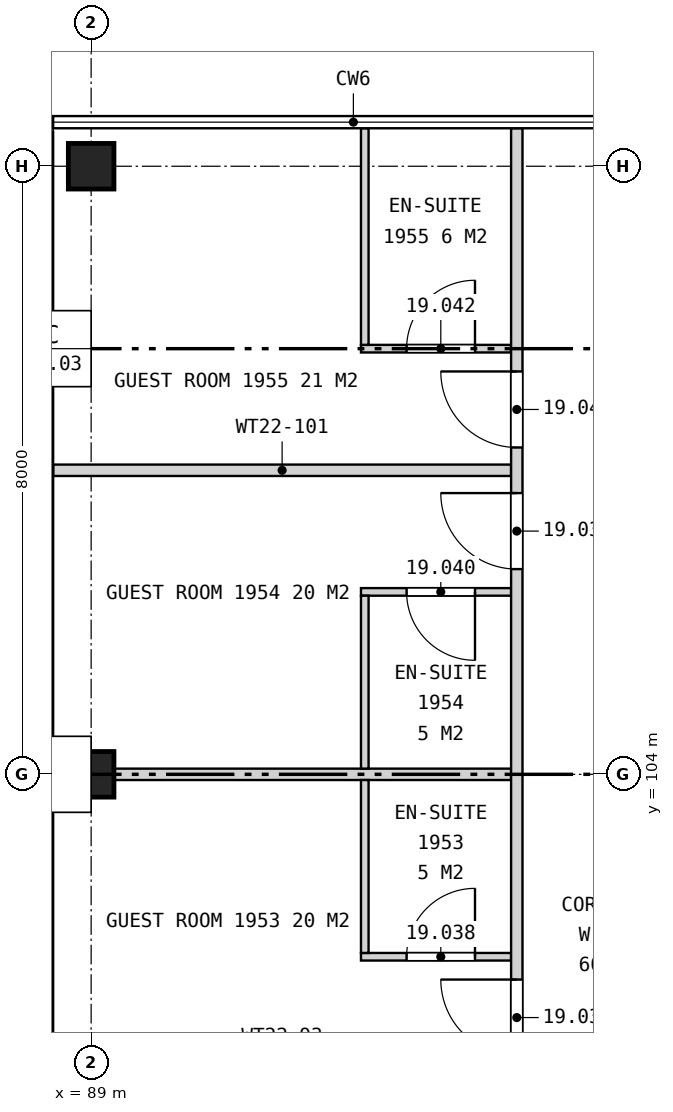
"""IFC4 building model, lengths in metres.
Left out: names, types, materials, properties, quantities, classifications, styles, units other than length and angle.
Written with IfcOpenShell. Run it as: python <this file> out.ifc"""

import sys

from ifc_helpers import new_model, si_unit, direction, frame, frame_2d, origin, origin_2d, place, context, subcontext, project, spatial, rectangle, extrude, element, fill, save


model = new_model("IFC4")
c1 = context("Model", 3, precision=1e-05, world=origin(), true_north=direction((0.0, 1.0)))
c2 = subcontext(c1, "Body", "Model", "MODEL_VIEW")
j1 = project(units=[si_unit("LENGTHUNIT", "METRE"), si_unit("PLANEANGLEUNIT", "RADIAN")], contexts=[c1])
p1 = place(None, origin())
s1 = spatial("IfcSite", under=j1, at=p1, CompositionType="ELEMENT")
p2 = place(p1, origin())
s2 = spatial("IfcBuilding", under=s1, at=p2, CompositionType="ELEMENT")
p3 = place(p2, frame((0.0, 0.0, 97.9)))
s3 = spatial("IfcBuildingStorey", under=s2, at=p3, CompositionType="ELEMENT", Elevation=97.9)
for number, where, z_axis, x_axis in (
    (1, (89.0, 104.0, 0.0), (0.0, 0.0, 1.0), (1.0, 0.0, 0.0)),
    (2, (89.0, 112.0, 0.0), (0.0, 0.0, 1.0), (1.0, 0.0, 0.0)),
):
    element("IfcColumn", number, at=place(p3, frame(where, z_axis=z_axis, x_axis=x_axis)), inside=s3, PredefinedType="COLUMN", context=c2, shape_type="SweptSolid", body=[
        extrude(rectangle(XDim=0.6, YDim=0.6, at=origin_2d()), origin(), (0.0, 0.0, 1.0), 3.7),
    ])
p4 = place(p3, frame((92.55, 101.6, 0.0), z_axis=(0.0, 0.0, 1.0), x_axis=(1.0, 0.0, 0.0)))
e3 = element("IfcWall", 3, at=p4, inside=s3, PredefinedType="PLUMBINGWALL", context=c2, shape_type="SweptSolid", body=[
    extrude(rectangle(XDim=1.975, YDim=0.1, at=frame_2d((0.987, 0.0))), origin(), (0.0, 0.0, 1.0), 3.7),
])
p5 = place(p4, frame((0.6, 0.0, 0.0)))
e4 = element("IfcOpeningElement", 4, at=p5, cuts=e3, PredefinedType="OPENING", context=c2, shape_type="SweptSolid", body=[
    extrude(rectangle(XDim=0.9, YDim=2.1, at=frame_2d((0.45, 1.05))), frame((0.0, 0.06, 0.0), z_axis=(0.0, -1.0, 0.0), x_axis=(1.0, 0.0, 0.0)), (0.0, 0.0, 1.0), 0.12),
])
p6 = place(p3, frame((89.3, 104.0, 0.0), z_axis=(0.0, 0.0, 1.0), x_axis=(1.0, 0.0, 0.0)))
e5 = element("IfcWall", 5, at=p6, inside=s3, PredefinedType="PARTITIONING", context=c2, shape_type="SweptSolid", body=[
    extrude(rectangle(XDim=5.225, YDim=0.15, at=frame_2d((2.612, 0.0))), origin(), (0.0, 0.0, 1.0), 2.957),
])
p7 = place(p3, frame((92.55, 106.4, 0.0), z_axis=(0.0, 0.0, 1.0), x_axis=(1.0, 0.0, 0.0)))
e6 = element("IfcWall", 6, at=p7, inside=s3, PredefinedType="PLUMBINGWALL", context=c2, shape_type="SweptSolid", body=[
    extrude(rectangle(XDim=1.975, YDim=0.1, at=frame_2d((0.987, 0.0))), origin(), (0.0, 0.0, 1.0), 3.7),
])
p8 = place(p7, frame((0.6, 0.0, 0.0)))
e7 = element("IfcOpeningElement", 7, at=p8, cuts=e6, PredefinedType="OPENING", context=c2, shape_type="SweptSolid", body=[
    extrude(rectangle(XDim=0.9, YDim=2.1, at=frame_2d((0.45, 1.05))), frame((0.0, 0.06, 0.0), z_axis=(0.0, -1.0, 0.0), x_axis=(1.0, 0.0, 0.0)), (0.0, 0.0, 1.0), 0.12),
])
p9 = place(p3, frame((88.5, 108.0, 0.0), z_axis=(0.0, 0.0, 1.0), x_axis=(1.0, 0.0, 0.0)))
e8 = element("IfcWall", 8, at=p9, inside=s3, PredefinedType="PARTITIONING", context=c2, shape_type="SweptSolid", body=[
    extrude(rectangle(XDim=6.025, YDim=0.15, at=frame_2d((3.012, 0.0))), origin(), (0.0, 0.0, 1.0), 2.963),
])
p10 = place(p3, frame((92.55, 109.6, 0.0), z_axis=(0.0, 0.0, 1.0), x_axis=(1.0, 0.0, 0.0)))
e9 = element("IfcWall", 9, at=p10, inside=s3, PredefinedType="PLUMBINGWALL", context=c2, shape_type="SweptSolid", body=[
    extrude(rectangle(XDim=1.975, YDim=0.1, at=frame_2d((0.987, 0.0))), origin(), (0.0, 0.0, 1.0), 3.7),
])
p11 = place(p10, frame((0.6, 0.0, 0.0)))
e10 = element("IfcOpeningElement", 10, at=p11, cuts=e9, PredefinedType="OPENING", context=c2, shape_type="SweptSolid", body=[
    extrude(rectangle(XDim=0.9, YDim=2.1, at=frame_2d((0.45, 1.05))), frame((0.0, 0.06, 0.0), z_axis=(0.0, -1.0, 0.0), x_axis=(1.0, 0.0, 0.0)), (0.0, 0.0, 1.0), 0.12),
])
for number, where, z_axis, x_axis in (
    (11, (92.6, 101.65, 0.0), (0.0, 0.0, 1.0), (0.0, 1.0, 0.0)),
    (12, (92.6, 104.075, 0.0), (0.0, 0.0, 1.0), (0.0, 1.0, 0.0)),
):
    element("IfcWall", number, at=place(p3, frame(where, z_axis=z_axis, x_axis=x_axis)), inside=s3, PredefinedType="PLUMBINGWALL", context=c2, shape_type="SweptSolid", body=[
        extrude(rectangle(XDim=2.275, YDim=0.1, at=frame_2d((1.138, 0.0))), origin(), (0.0, 0.0, 1.0), 3.7),
    ])
p12 = place(p3, frame((92.6, 109.65, 0.0), z_axis=(0.0, 0.0, 1.0), x_axis=(0.0, 1.0, 0.0)))
e13 = element("IfcWall", 13, at=p12, inside=s3, PredefinedType="PLUMBINGWALL", context=c2, shape_type="SweptSolid", body=[
    extrude(rectangle(XDim=2.85, YDim=0.1, at=frame_2d((1.425, 0.0))), origin(), (0.0, 0.0, 1.0), 2.963),
])
p13 = place(p3, frame((94.6, 87.5, 0.0), z_axis=(0.0, 0.0, 1.0), x_axis=(0.0, 1.0, 0.0)))
e14 = element("IfcWall", 14, at=p13, inside=s3, PredefinedType="PARTITIONING", context=c2, shape_type="SweptSolid", body=[
    extrude(rectangle(XDim=25.0, YDim=0.15, at=frame_2d((12.5, 0.0))), origin(), (0.0, 0.0, 1.0), 2.957),
])
p14 = place(p13, frame((2.4, 0.0, 0.0)))
e15 = element("IfcOpeningElement", 15, at=p14, cuts=e14, PredefinedType="OPENING", context=c2, shape_type="SweptSolid", body=[
    extrude(rectangle(XDim=1.2, YDim=2.2, at=frame_2d((0.6, 1.1))), frame((0.0, 0.085, 0.0), z_axis=(0.0, -1.0, 0.0), x_axis=(1.0, 0.0, 0.0)), (0.0, 0.0, 1.0), 0.17),
])
p15 = place(p13, frame((11.2, 0.0, 0.0)))
e16 = element("IfcOpeningElement", 16, at=p15, cuts=e14, PredefinedType="OPENING", context=c2, shape_type="SweptSolid", body=[
    extrude(rectangle(XDim=1.0, YDim=2.1, at=frame_2d((0.5, 1.05))), frame((0.0, 0.085, 0.0), z_axis=(0.0, -1.0, 0.0), x_axis=(1.0, 0.0, 0.0)), (0.0, 0.0, 1.0), 0.17),
])
p16 = place(p13, frame((12.8, 0.0, 0.0)))
e17 = element("IfcOpeningElement", 17, at=p16, cuts=e14, PredefinedType="OPENING", context=c2, shape_type="SweptSolid", body=[
    extrude(rectangle(XDim=1.0, YDim=2.1, at=frame_2d((0.5, 1.05))), frame((0.0, 0.085, 0.0), z_axis=(0.0, -1.0, 0.0), x_axis=(1.0, 0.0, 0.0)), (0.0, 0.0, 1.0), 0.17),
])
p17 = place(p13, frame((19.2, 0.0, 0.0)))
e18 = element("IfcOpeningElement", 18, at=p17, cuts=e14, PredefinedType="OPENING", context=c2, shape_type="SweptSolid", body=[
    extrude(rectangle(XDim=1.0, YDim=2.1, at=frame_2d((0.5, 1.05))), frame((0.0, 0.085, 0.0), z_axis=(0.0, -1.0, 0.0), x_axis=(1.0, 0.0, 0.0)), (0.0, 0.0, 1.0), 0.17),
])
p18 = place(p13, frame((20.8, 0.0, 0.0)))
e19 = element("IfcOpeningElement", 19, at=p18, cuts=e14, PredefinedType="OPENING", context=c2, shape_type="SweptSolid", body=[
    extrude(rectangle(XDim=1.0, YDim=2.1, at=frame_2d((0.5, 1.05))), frame((0.0, 0.085, 0.0), z_axis=(0.0, -1.0, 0.0), x_axis=(1.0, 0.0, 0.0)), (0.0, 0.0, 1.0), 0.17),
])
p19 = place(p16, origin())
e20 = element("IfcDoor", 20, at=p19, inside=s3, OperationType="SINGLE_SWING_RIGHT", PredefinedType="DOOR", context=c2, shape_type="SweptSolid", body=[
    extrude(rectangle(XDim=1.0, YDim=2.1, at=frame_2d((0.5, 1.05))), frame((0.0, 0.025, 0.0), z_axis=(0.0, -1.0, 0.0), x_axis=(1.0, 0.0, 0.0)), (0.0, 0.0, 1.0), 0.05),
])
fill(e17, e20)
p20 = place(p5, origin())
e21 = element("IfcDoor", 21, at=p20, inside=s3, OperationType="SINGLE_SWING_RIGHT", PredefinedType="DOOR", context=c2, shape_type="SweptSolid", body=[
    extrude(rectangle(XDim=0.9, YDim=2.1, at=frame_2d((0.45, 1.05))), frame((0.0, 0.025, 0.0), z_axis=(0.0, -1.0, 0.0), x_axis=(1.0, 0.0, 0.0)), (0.0, 0.0, 1.0), 0.05),
])
fill(e4, e21)
p21 = place(p17, origin())
e22 = element("IfcDoor", 22, at=p21, inside=s3, OperationType="SINGLE_SWING_RIGHT", PredefinedType="DOOR", context=c2, shape_type="SweptSolid", body=[
    extrude(rectangle(XDim=1.0, YDim=2.1, at=frame_2d((0.5, 1.05))), frame((0.0, 0.025, 0.0), z_axis=(0.0, -1.0, 0.0), x_axis=(1.0, 0.0, 0.0)), (0.0, 0.0, 1.0), 0.05),
])
fill(e18, e22)
p22 = place(p8, frame((0.9, 0.0, 0.0), z_axis=(0.0, 0.0, 1.0), x_axis=(-1.0, 0.0, 0.0)))
e23 = element("IfcDoor", 23, at=p22, inside=s3, OperationType="SINGLE_SWING_LEFT", PredefinedType="DOOR", context=c2, shape_type="SweptSolid", body=[
    extrude(rectangle(XDim=0.9, YDim=2.1, at=frame_2d((0.45, 1.05))), frame((0.0, 0.025, 0.0), z_axis=(0.0, -1.0, 0.0), x_axis=(1.0, 0.0, 0.0)), (0.0, 0.0, 1.0), 0.05),
])
fill(e7, e23)
p23 = place(p18, origin())
e24 = element("IfcDoor", 24, at=p23, inside=s3, OperationType="SINGLE_SWING_RIGHT", PredefinedType="DOOR", context=c2, shape_type="SweptSolid", body=[
    extrude(rectangle(XDim=1.0, YDim=2.1, at=frame_2d((0.5, 1.05))), frame((0.0, 0.025, 0.0), z_axis=(0.0, -1.0, 0.0), x_axis=(1.0, 0.0, 0.0)), (0.0, 0.0, 1.0), 0.05),
])
fill(e19, e24)
p24 = place(p11, origin())
e25 = element("IfcDoor", 25, at=p24, inside=s3, OperationType="SINGLE_SWING_RIGHT", PredefinedType="DOOR", context=c2, shape_type="SweptSolid", body=[
    extrude(rectangle(XDim=0.9, YDim=2.1, at=frame_2d((0.45, 1.05))), frame((0.0, 0.025, 0.0), z_axis=(0.0, -1.0, 0.0), x_axis=(1.0, 0.0, 0.0)), (0.0, 0.0, 1.0), 0.05),
])
fill(e10, e25)
save(model, sys.argv[1])
